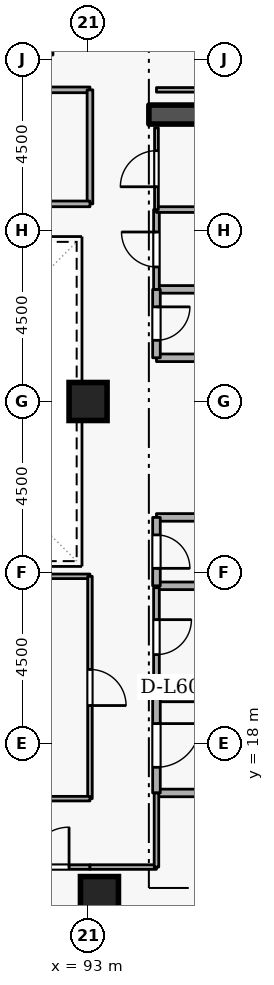
"""IFC4 building model, lengths in metres.
Left out: names, types, materials, properties, quantities, classifications, styles, units other than length and angle.
Written with IfcOpenShell. Run it as: python <this file> out.ifc"""

import sys

from ifc_helpers import new_model, si_unit, direction, frame, frame_2d, origin, origin_2d, place, context, subcontext, project, spatial, rectangle, extrude, element, fill, save


model = new_model("IFC4")
c1 = context("Model", 3, precision=1e-05, world=origin(), true_north=direction((0.0, 1.0)))
c2 = subcontext(c1, "Body", "Model", "MODEL_VIEW")
j1 = project(units=[si_unit("LENGTHUNIT", "METRE"), si_unit("PLANEANGLEUNIT", "RADIAN")], contexts=[c1])
p1 = place(None, origin())
s1 = spatial("IfcSite", under=j1, at=p1, CompositionType="ELEMENT")
p2 = place(p1, origin())
s2 = spatial("IfcBuilding", under=s1, at=p2, CompositionType="ELEMENT")
p3 = place(p2, frame((0.0, 0.0, 225.9)))
s3 = spatial("IfcBuildingStorey", under=s2, at=p3, CompositionType="ELEMENT", Elevation=225.9)
p4 = place(p3, frame((94.6, 34.55, 0.0), z_axis=(0.0, 0.0, 1.0), x_axis=(1.0, 0.0, 0.0)))
e1 = element("IfcWall", 1, at=p4, inside=s3, PredefinedType="SHEAR", context=c2, shape_type="SweptSolid", body=[
    extrude(rectangle(XDim=5.8, YDim=0.5, at=frame_2d((2.9, 0.0))), origin(), (0.0, 0.0, 1.0), 3.6),
])
for number, where, z_axis, x_axis in (
    (2, (93.3, 14.0, 0.0), (0.0, 0.0, 1.0), (1.0, 0.0, 0.0)),
    (3, (93.0, 27.0, 0.0), (0.0, 0.0, 1.0), (1.0, 0.0, 0.0)),
):
    element("IfcColumn", number, at=place(p3, frame(where, z_axis=z_axis, x_axis=x_axis)), inside=s3, PredefinedType="COLUMN", context=c2, shape_type="SweptSolid", body=[
        extrude(rectangle(XDim=1.0, YDim=1.0, at=origin_2d()), origin(), (0.0, 0.0, 1.0), 3.6),
    ])
p5 = place(p3, frame((94.8, 16.7, 0.0), z_axis=(0.0, 0.0, 1.0), x_axis=(1.0, 0.0, 0.0)))
e4 = element("IfcWall", 4, at=p5, inside=s3, PredefinedType="STANDARD", context=c2, shape_type="SweptSolid", body=[
    extrude(rectangle(XDim=5.7, YDim=0.2, at=frame_2d((2.85, 0.0))), origin(), (0.0, 0.0, 1.0), 3.3),
])
p6 = place(p3, frame((97.1, 19.2, 0.0), z_axis=(0.0, 0.0, 1.0), x_axis=(-1.0, 0.0, 0.0)))
e5 = element("IfcWall", 5, at=p6, inside=s3, PredefinedType="STANDARD", context=c2, shape_type="SweptSolid", body=[
    extrude(rectangle(XDim=2.3, YDim=0.2, at=frame_2d((1.15, 0.0))), origin(), (0.0, 0.0, 1.0), 2.505),
])
p7 = place(p3, frame((94.8, 19.2, 0.0), z_axis=(0.0, 0.0, 1.0), x_axis=(0.0, -1.0, 0.0)))
e6 = element("IfcWall", 6, at=p7, inside=s3, PredefinedType="STANDARD", context=c2, shape_type="SweptSolid", body=[
    extrude(rectangle(XDim=2.5, YDim=0.2, at=frame_2d((1.25, 0.0))), origin(), (0.0, 0.0, 1.0), 3.3),
])
p8 = place(p7, frame((0.675, 0.0, 0.0)))
e7 = element("IfcOpeningElement", 7, at=p8, cuts=e6, PredefinedType="OPENING", context=c2, shape_type="SweptSolid", body=[
    extrude(rectangle(XDim=1.15, YDim=2.1, at=frame_2d((0.575, 1.05))), frame((0.0, 0.11, 0.0), z_axis=(0.0, -1.0, 0.0), x_axis=(1.0, 0.0, 0.0)), (0.0, 0.0, 1.0), 0.22),
])
for number, where, z_axis, x_axis in (
    (8, (94.8, 28.15, 0.0), (0.0, 0.0, 1.0), (1.0, 0.0, 0.0)),
    (9, (96.85, 29.95, 0.0), (0.0, 0.0, 1.0), (-1.0, 0.0, 0.0)),
):
    element("IfcWall", number, at=place(p3, frame(where, z_axis=z_axis, x_axis=x_axis)), inside=s3, PredefinedType="STANDARD", context=c2, shape_type="SweptSolid", body=[
        extrude(rectangle(XDim=2.05, YDim=0.2, at=frame_2d((1.025, 0.0))), origin(), (0.0, 0.0, 1.0), 3.3),
    ])
p9 = place(p3, frame((94.8, 29.95, 0.0), z_axis=(0.0, 0.0, 1.0), x_axis=(0.0, -1.0, 0.0)))
e10 = element("IfcWall", 10, at=p9, inside=s3, PredefinedType="STANDARD", context=c2, shape_type="SweptSolid", body=[
    extrude(rectangle(XDim=1.8, YDim=0.2, at=frame_2d((0.9, 0.0))), origin(), (0.0, 0.0, 1.0), 3.3),
])
p10 = place(p9, frame((0.46, 0.0, 0.0)))
e11 = element("IfcOpeningElement", 11, at=p10, cuts=e10, PredefinedType="OPENING", context=c2, shape_type="SweptSolid", body=[
    extrude(rectangle(XDim=0.88, YDim=2.04, at=frame_2d((0.44, 1.02))), frame((0.0, 0.11, 0.0), z_axis=(0.0, -1.0, 0.0), x_axis=(1.0, 0.0, 0.0)), (0.0, 0.0, 1.0), 0.22),
])
for number, where, z_axis, x_axis in (
    (12, (94.8, 22.15, 0.0), (0.0, 0.0, 1.0), (1.0, 0.0, 0.0)),
    (13, (96.85, 23.95, 0.0), (0.0, 0.0, 1.0), (-1.0, 0.0, 0.0)),
):
    element("IfcWall", number, at=place(p3, frame(where, z_axis=z_axis, x_axis=x_axis)), inside=s3, PredefinedType="STANDARD", context=c2, shape_type="SweptSolid", body=[
        extrude(rectangle(XDim=2.05, YDim=0.2, at=frame_2d((1.025, 0.0))), origin(), (0.0, 0.0, 1.0), 3.3),
    ])
p11 = place(p3, frame((94.8, 23.95, 0.0), z_axis=(0.0, 0.0, 1.0), x_axis=(0.0, -1.0, 0.0)))
e14 = element("IfcWall", 14, at=p11, inside=s3, PredefinedType="STANDARD", context=c2, shape_type="SweptSolid", body=[
    extrude(rectangle(XDim=1.8, YDim=0.2, at=frame_2d((0.9, 0.0))), origin(), (0.0, 0.0, 1.0), 3.3),
])
p12 = place(p11, frame((0.46, 0.0, 0.0)))
e15 = element("IfcOpeningElement", 15, at=p12, cuts=e14, PredefinedType="OPENING", context=c2, shape_type="SweptSolid", body=[
    extrude(rectangle(XDim=0.88, YDim=2.04, at=frame_2d((0.44, 1.02))), frame((0.0, 0.11, 0.0), z_axis=(0.0, -1.0, 0.0), x_axis=(1.0, 0.0, 0.0)), (0.0, 0.0, 1.0), 0.22),
])
p13 = place(p3, frame((94.8, 19.5, 0.0), z_axis=(0.0, 0.0, 1.0), x_axis=(1.0, 0.0, 0.0)))
e16 = element("IfcWall", 16, at=p13, inside=s3, PredefinedType="PARTITIONING", context=c2, shape_type="SweptSolid", body=[
    extrude(rectangle(XDim=2.05, YDim=0.15, at=frame_2d((1.025, 0.0))), origin(), (0.0, 0.0, 1.0), 2.505),
])
p14 = place(p3, frame((94.8, 22.1, 0.0), z_axis=(0.0, 0.0, 1.0), x_axis=(0.0, -1.0, 0.0)))
e17 = element("IfcWall", 17, at=p14, inside=s3, PredefinedType="PARTITIONING", context=c2, shape_type="SweptSolid", body=[
    extrude(rectangle(XDim=2.6, YDim=0.15, at=frame_2d((1.3, 0.0))), origin(), (0.0, 0.0, 1.0), 3.3),
])
p15 = place(p14, frame((0.84, 0.0, 0.0)))
e18 = element("IfcOpeningElement", 18, at=p15, cuts=e17, PredefinedType="OPENING", context=c2, shape_type="SweptSolid", body=[
    extrude(rectangle(XDim=0.92, YDim=2.08, at=frame_2d((0.46, 1.04))), frame((0.0, 0.085, 0.0), z_axis=(0.0, -1.0, 0.0), x_axis=(1.0, 0.0, 0.0)), (0.0, 0.0, 1.0), 0.17),
])
p16 = place(p3, frame((94.8, 29.95, 0.0), z_axis=(0.0, 0.0, 1.0), x_axis=(0.0, 1.0, 0.0)))
e19 = element("IfcWall", 19, at=p16, inside=s3, PredefinedType="PARTITIONING", context=c2, shape_type="SweptSolid", body=[
    extrude(rectangle(XDim=2.1, YDim=0.15, at=frame_2d((1.05, 0.0))), origin(), (0.0, 0.0, 1.0), 3.3),
])
p17 = place(p16, frame((0.59, 0.0, 0.0)))
e20 = element("IfcOpeningElement", 20, at=p17, cuts=e19, PredefinedType="OPENING", context=c2, shape_type="SweptSolid", body=[
    extrude(rectangle(XDim=0.92, YDim=2.08, at=frame_2d((0.46, 1.04))), frame((0.0, 0.085, 0.0), z_axis=(0.0, -1.0, 0.0), x_axis=(1.0, 0.0, 0.0)), (0.0, 0.0, 1.0), 0.17),
])
p18 = place(p3, frame((94.8, 32.05, 0.0), z_axis=(0.0, 0.0, 1.0), x_axis=(1.0, 0.0, 0.0)))
e21 = element("IfcWall", 21, at=p18, inside=s3, PredefinedType="PARTITIONING", context=c2, shape_type="SweptSolid", body=[
    extrude(rectangle(XDim=2.05, YDim=0.15, at=frame_2d((1.025, 0.0))), origin(), (0.0, 0.0, 1.0), 3.3),
])
p19 = place(p3, frame((94.8, 32.05, 0.0), z_axis=(0.0, 0.0, 1.0), x_axis=(0.0, 1.0, 0.0)))
e22 = element("IfcWall", 22, at=p19, inside=s3, PredefinedType="PARTITIONING", context=c2, shape_type="SweptSolid", body=[
    extrude(rectangle(XDim=2.15, YDim=0.1, at=frame_2d((1.075, 0.0))), origin(), (0.0, 0.0, 1.0), 3.3),
])
p20 = place(p19, frame((0.6, 0.0, 0.0)))
e23 = element("IfcOpeningElement", 23, at=p20, cuts=e22, PredefinedType="OPENING", context=c2, shape_type="SweptSolid", body=[
    extrude(rectangle(XDim=0.95, YDim=2.1, at=frame_2d((0.475, 1.05))), frame((0.0, 0.06, 0.0), z_axis=(0.0, -1.0, 0.0), x_axis=(1.0, 0.0, 0.0)), (0.0, 0.0, 1.0), 0.12),
])
p21 = place(p3, frame((94.8, 35.2, 0.0), z_axis=(0.0, 0.0, 1.0), x_axis=(1.0, 0.0, 0.0)))
e24 = element("IfcWall", 24, at=p21, inside=s3, PredefinedType="PARTITIONING", context=c2, shape_type="SweptSolid", body=[
    extrude(rectangle(XDim=5.9, YDim=0.12, at=frame_2d((2.95, 0.0))), origin(), (0.0, 0.0, 1.0), 3.3),
])
p22 = place(p3, frame((90.9, 14.75, 0.0), z_axis=(0.0, 0.0, 1.0), x_axis=(1.0, 0.0, 0.0)))
e25 = element("IfcWall", 25, at=p22, inside=s3, PredefinedType="PARTITIONING", context=c2, shape_type="SweptSolid", body=[
    extrude(rectangle(XDim=2.15, YDim=0.12, at=frame_2d((1.075, 0.0))), origin(), (0.0, 0.0, 1.0), 3.3),
])
p23 = place(p22, frame((0.55, 0.0, 0.0)))
e26 = element("IfcOpeningElement", 26, at=p23, cuts=e25, PredefinedType="OPENING", context=c2, shape_type="SweptSolid", body=[
    extrude(rectangle(XDim=1.05, YDim=2.1, at=frame_2d((0.525, 1.05))), frame((0.0, 0.07, 0.0), z_axis=(0.0, -1.0, 0.0), x_axis=(1.0, 0.0, 0.0)), (0.0, 0.0, 1.0), 0.14),
])
p24 = place(p3, frame((93.05, 14.75, 0.0), z_axis=(0.0, 0.0, 1.0), x_axis=(1.0, 0.0, 0.0)))
e27 = element("IfcWall", 27, at=p24, inside=s3, PredefinedType="PARTITIONING", context=c2, shape_type="SweptSolid", body=[
    extrude(rectangle(XDim=1.75, YDim=0.12, at=frame_2d((0.875, 0.0))), origin(), (0.0, 0.0, 1.0), 3.3),
])
p25 = place(p3, frame((94.8, 14.75, 0.0), z_axis=(0.0, 0.0, 1.0), x_axis=(0.0, 1.0, 0.0)))
e28 = element("IfcWall", 28, at=p25, inside=s3, PredefinedType="PARTITIONING", context=c2, shape_type="SweptSolid", body=[
    extrude(rectangle(XDim=1.95, YDim=0.12, at=frame_2d((0.975, 0.0))), origin(), (0.0, 0.0, 1.0), 3.3),
])
p26 = place(p3, frame((89.3, 22.4, 0.0), z_axis=(0.0, 0.0, 1.0), x_axis=(1.0, 0.0, 0.0)))
e29 = element("IfcWall", 29, at=p26, inside=s3, PredefinedType="PARTITIONING", context=c2, shape_type="SweptSolid", body=[
    extrude(rectangle(XDim=3.75, YDim=0.12, at=frame_2d((1.875, 0.0))), origin(), (0.0, 0.0, 1.0), 3.3),
])
p27 = place(p3, frame((93.05, 22.4, 0.0), z_axis=(0.0, 0.0, 1.0), x_axis=(0.0, -1.0, 0.0)))
e30 = element("IfcWall", 30, at=p27, inside=s3, PredefinedType="PARTITIONING", context=c2, shape_type="SweptSolid", body=[
    extrude(rectangle(XDim=5.85, YDim=0.12, at=frame_2d((2.925, 0.0))), origin(), (0.0, 0.0, 1.0), 3.3),
])
p28 = place(p27, frame((2.45, 0.0, 0.0)))
e31 = element("IfcOpeningElement", 31, at=p28, cuts=e30, PredefinedType="OPENING", context=c2, shape_type="SweptSolid", body=[
    extrude(rectangle(XDim=0.95, YDim=2.1, at=frame_2d((0.475, 1.05))), frame((0.0, 0.07, 0.0), z_axis=(0.0, -1.0, 0.0), x_axis=(1.0, 0.0, 0.0)), (0.0, 0.0, 1.0), 0.14),
])
p29 = place(p3, frame((93.05, 16.55, 0.0), z_axis=(0.0, 0.0, 1.0), x_axis=(-1.0, 0.0, 0.0)))
e32 = element("IfcWall", 32, at=p29, inside=s3, PredefinedType="PARTITIONING", context=c2, shape_type="SweptSolid", body=[
    extrude(rectangle(XDim=3.75, YDim=0.12, at=frame_2d((1.875, 0.0))), origin(), (0.0, 0.0, 1.0), 3.3),
])
p30 = place(p3, frame((89.05, 35.2, 0.0), z_axis=(0.0, 0.0, 1.0), x_axis=(1.0, 0.0, 0.0)))
e33 = element("IfcWall", 33, at=p30, inside=s3, PredefinedType="PARTITIONING", context=c2, shape_type="SweptSolid", body=[
    extrude(rectangle(XDim=4.0, YDim=0.15, at=frame_2d((2.0, 0.0))), origin(), (0.0, 0.0, 1.0), 3.3),
])
p31 = place(p30, frame((1.35, 0.0, 0.0)))
e34 = element("IfcOpeningElement", 34, at=p31, cuts=e33, PredefinedType="OPENING", context=c2, shape_type="SweptSolid", body=[
    extrude(rectangle(XDim=1.3, YDim=2.12, at=frame_2d((0.65, 1.06))), frame((0.0, 0.085, 0.0), z_axis=(0.0, -1.0, 0.0), x_axis=(1.0, 0.0, 0.0)), (0.0, 0.0, 1.0), 0.17),
])
p32 = place(p3, frame((93.05, 35.2, 0.0), z_axis=(0.0, 0.0, 1.0), x_axis=(0.0, -1.0, 0.0)))
e35 = element("IfcWall", 35, at=p32, inside=s3, PredefinedType="PARTITIONING", context=c2, shape_type="SweptSolid", body=[
    extrude(rectangle(XDim=3.0, YDim=0.15, at=frame_2d((1.5, 0.0))), origin(), (0.0, 0.0, 1.0), 3.3),
])
p33 = place(p3, frame((93.05, 32.2, 0.0), z_axis=(0.0, 0.0, 1.0), x_axis=(-1.0, 0.0, 0.0)))
e36 = element("IfcWall", 36, at=p33, inside=s3, PredefinedType="PARTITIONING", context=c2, shape_type="SweptSolid", body=[
    extrude(rectangle(XDim=4.0, YDim=0.15, at=frame_2d((2.0, 0.0))), origin(), (0.0, 0.0, 1.0), 3.3),
])
p34 = place(p8, origin())
e37 = element("IfcDoor", 37, at=p34, inside=s3, OperationType="SINGLE_SWING_LEFT", PredefinedType="DOOR", context=c2, shape_type="SweptSolid", body=[
    extrude(rectangle(XDim=1.15, YDim=2.1, at=frame_2d((0.575, 1.05))), frame((0.0, 0.025, 0.0), z_axis=(0.0, -1.0, 0.0), x_axis=(1.0, 0.0, 0.0)), (0.0, 0.0, 1.0), 0.05),
])
fill(e7, e37)
p35 = place(p10, origin())
e38 = element("IfcDoor", 38, at=p35, inside=s3, OperationType="SINGLE_SWING_LEFT", PredefinedType="DOOR", context=c2, shape_type="SweptSolid", body=[
    extrude(rectangle(XDim=0.88, YDim=2.04, at=frame_2d((0.44, 1.02))), frame((0.0, 0.025, 0.0), z_axis=(0.0, -1.0, 0.0), x_axis=(1.0, 0.0, 0.0)), (0.0, 0.0, 1.0), 0.05),
])
fill(e11, e38)
p36 = place(p12, origin())
e39 = element("IfcDoor", 39, at=p36, inside=s3, OperationType="SINGLE_SWING_RIGHT", PredefinedType="DOOR", context=c2, shape_type="SweptSolid", body=[
    extrude(rectangle(XDim=0.88, YDim=2.04, at=frame_2d((0.44, 1.02))), frame((0.0, 0.025, 0.0), z_axis=(0.0, -1.0, 0.0), x_axis=(1.0, 0.0, 0.0)), (0.0, 0.0, 1.0), 0.05),
])
fill(e15, e39)
p37 = place(p15, origin())
e40 = element("IfcDoor", 40, at=p37, inside=s3, OperationType="SINGLE_SWING_LEFT", PredefinedType="DOOR", context=c2, shape_type="SweptSolid", body=[
    extrude(rectangle(XDim=0.92, YDim=2.08, at=frame_2d((0.46, 1.04))), frame((0.0, 0.025, 0.0), z_axis=(0.0, -1.0, 0.0), x_axis=(1.0, 0.0, 0.0)), (0.0, 0.0, 1.0), 0.05),
])
fill(e18, e40)
p38 = place(p17, origin())
e41 = element("IfcDoor", 41, at=p38, inside=s3, OperationType="SINGLE_SWING_RIGHT", PredefinedType="DOOR", context=c2, shape_type="SweptSolid", body=[
    extrude(rectangle(XDim=0.92, YDim=2.08, at=frame_2d((0.46, 1.04))), frame((0.0, 0.025, 0.0), z_axis=(0.0, -1.0, 0.0), x_axis=(1.0, 0.0, 0.0)), (0.0, 0.0, 1.0), 0.05),
])
fill(e20, e41)
p39 = place(p20, origin())
e42 = element("IfcDoor", 42, at=p39, inside=s3, OperationType="SINGLE_SWING_LEFT", PredefinedType="DOOR", context=c2, shape_type="SweptSolid", body=[
    extrude(rectangle(XDim=0.95, YDim=2.1, at=frame_2d((0.475, 1.05))), frame((0.0, 0.025, 0.0), z_axis=(0.0, -1.0, 0.0), x_axis=(1.0, 0.0, 0.0)), (0.0, 0.0, 1.0), 0.05),
])
fill(e23, e42)
p40 = place(p23, origin())
e43 = element("IfcDoor", 43, at=p40, inside=s3, OperationType="SINGLE_SWING_RIGHT", PredefinedType="DOOR", context=c2, shape_type="SweptSolid", body=[
    extrude(rectangle(XDim=1.05, YDim=2.1, at=frame_2d((0.525, 1.05))), frame((0.0, 0.025, 0.0), z_axis=(0.0, -1.0, 0.0), x_axis=(1.0, 0.0, 0.0)), (0.0, 0.0, 1.0), 0.05),
])
fill(e26, e43)
p41 = place(p28, origin())
e44 = element("IfcDoor", 44, at=p41, inside=s3, OperationType="SINGLE_SWING_RIGHT", PredefinedType="DOOR", context=c2, shape_type="SweptSolid", body=[
    extrude(rectangle(XDim=0.95, YDim=2.1, at=frame_2d((0.475, 1.05))), frame((0.0, 0.025, 0.0), z_axis=(0.0, -1.0, 0.0), x_axis=(1.0, 0.0, 0.0)), (0.0, 0.0, 1.0), 0.05),
])
fill(e31, e44)
save(model, sys.argv[1])
